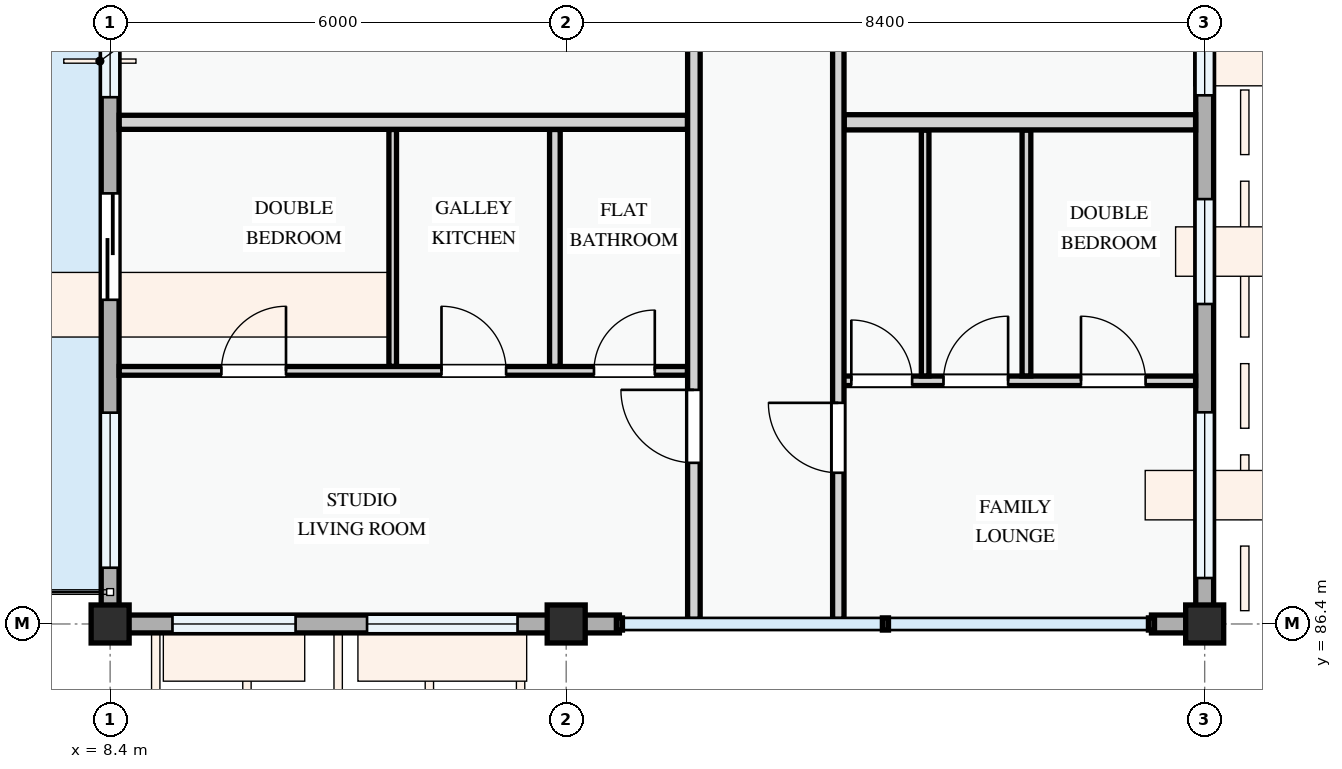
"""IFC4 building model, lengths in metres.
Left out: names, types, materials, properties, quantities, classifications, styles, units other than length and angle.
Written with IfcOpenShell. Run it as: python <this file> out.ifc"""

import sys

from ifc_helpers import new_model, si_unit, direction, frame, frame_2d, origin, origin_2d, place, context, subcontext, project, spatial, rectangle, extrude, element, fill, save


model = new_model("IFC4")
c1 = context("Model", 3, precision=1e-05, world=origin(), true_north=direction((0.0, 1.0)))
c2 = subcontext(c1, "Body", "Model", "MODEL_VIEW")
j1 = project(units=[si_unit("LENGTHUNIT", "METRE"), si_unit("PLANEANGLEUNIT", "RADIAN")], contexts=[c1])
p1 = place(None, origin())
s1 = spatial("IfcSite", under=j1, at=p1, CompositionType="ELEMENT")
p2 = place(p1, origin())
s2 = spatial("IfcBuilding", under=s1, at=p2, CompositionType="ELEMENT")
p3 = place(p2, frame((0.0, 0.0, 44.4)))
s3 = spatial("IfcBuildingStorey", under=s2, at=p3, CompositionType="ELEMENT", Elevation=44.4)
for number, where, z_axis, x_axis in (
    (1, (8.4, 86.4, 0.0), (0.0, 0.0, 1.0), (1.0, 0.0, 0.0)),
    (2, (14.4, 86.4, 0.0), (0.0, 0.0, 1.0), (1.0, 0.0, 0.0)),
    (3, (22.8, 86.4, 0.0), (0.0, 0.0, 1.0), (1.0, 0.0, 0.0)),
):
    element("IfcColumn", number, at=place(p3, frame(where, z_axis=z_axis, x_axis=x_axis)), inside=s3, PredefinedType="COLUMN", context=c2, shape_type="SweptSolid", body=[
        extrude(rectangle(XDim=0.5, YDim=0.5, at=origin_2d()), origin(), (0.0, 0.0, 1.0), 3.3),
    ])
p4 = place(p3, frame((8.4, 94.8, 0.0), z_axis=(0.0, 0.0, 1.0), x_axis=(0.0, -1.0, 0.0)))
e4 = element("IfcWall", 4, at=p4, inside=s3, PredefinedType="STANDARD", context=c2, shape_type="SweptSolid", body=[
    extrude(rectangle(XDim=8.4, YDim=0.235, at=frame_2d((4.2, 0.0))), origin(), (0.0, 0.0, 1.0), 2.425),
])
p5 = place(p4, frame((2.735, 0.0, 0.0)))
e5 = element("IfcOpeningElement", 5, at=p5, cuts=e4, PredefinedType="OPENING", context=c2, shape_type="SweptSolid", body=[
    extrude(rectangle(XDim=1.4, YDim=2.2, at=frame_2d((0.7, 1.1))), frame((0.0, 0.127, 0.0), z_axis=(0.0, -1.0, 0.0), x_axis=(1.0, 0.0, 0.0)), (0.0, 0.0, 1.0), 0.255),
])
p6 = place(p4, frame((0.52, 0.0, 0.78)))
e6 = element("IfcOpeningElement", 6, at=p6, cuts=e4, PredefinedType="OPENING", context=c2, shape_type="SweptSolid", body=[
    extrude(rectangle(XDim=0.95, YDim=1.15, at=frame_2d((0.475, 0.575))), frame((0.0, 0.127, 0.0), z_axis=(0.0, -1.0, 0.0), x_axis=(1.0, 0.0, 0.0)), (0.0, 0.0, 1.0), 0.255),
])
p7 = place(p4, frame((5.62, 0.0, 0.78)))
e7 = element("IfcOpeningElement", 7, at=p7, cuts=e4, PredefinedType="OPENING", context=c2, shape_type="SweptSolid", body=[
    extrude(rectangle(XDim=2.04, YDim=1.46, at=frame_2d((1.02, 0.73))), frame((0.0, 0.127, 0.0), z_axis=(0.0, -1.0, 0.0), x_axis=(1.0, 0.0, 0.0)), (0.0, 0.0, 1.0), 0.255),
])
p8 = place(p3, frame((8.4, 86.4, 0.0), z_axis=(0.0, 0.0, 1.0), x_axis=(1.0, 0.0, 0.0)))
e8 = element("IfcWall", 8, at=p8, inside=s3, PredefinedType="STANDARD", context=c2, shape_type="SweptSolid", body=[
    extrude(rectangle(XDim=6.0, YDim=0.235, at=frame_2d((3.0, 0.0))), origin(), (0.0, 0.0, 1.0), 2.525),
])
p9 = place(p8, frame((0.82, 0.0, 0.78)))
e9 = element("IfcOpeningElement", 9, at=p9, cuts=e8, PredefinedType="OPENING", context=c2, shape_type="SweptSolid", body=[
    extrude(rectangle(XDim=1.62, YDim=1.38, at=frame_2d((0.81, 0.69))), frame((0.0, 0.127, 0.0), z_axis=(0.0, -1.0, 0.0), x_axis=(1.0, 0.0, 0.0)), (0.0, 0.0, 1.0), 0.255),
])
p10 = place(p8, frame((3.38, 0.0, 0.78)))
e10 = element("IfcOpeningElement", 10, at=p10, cuts=e8, PredefinedType="OPENING", context=c2, shape_type="SweptSolid", body=[
    extrude(rectangle(XDim=1.98, YDim=1.5, at=frame_2d((0.99, 0.75))), frame((0.0, 0.127, 0.0), z_axis=(0.0, -1.0, 0.0), x_axis=(1.0, 0.0, 0.0)), (0.0, 0.0, 1.0), 0.255),
])
p11 = place(p3, frame((14.4, 86.4, 0.0), z_axis=(0.0, 0.0, 1.0), x_axis=(1.0, 0.0, 0.0)))
e11 = element("IfcWall", 11, at=p11, inside=s3, PredefinedType="STANDARD", context=c2, shape_type="SweptSolid", body=[
    extrude(rectangle(XDim=0.7, YDim=0.235, at=frame_2d((0.35, 0.0))), origin(), (0.0, 0.0, 1.0), 2.375),
])
p12 = place(p3, frame((22.1, 86.4, 0.0), z_axis=(0.0, 0.0, 1.0), x_axis=(1.0, 0.0, 0.0)))
e12 = element("IfcWall", 12, at=p12, inside=s3, PredefinedType="STANDARD", context=c2, shape_type="SweptSolid", body=[
    extrude(rectangle(XDim=0.58, YDim=0.235, at=frame_2d((0.29, 0.0))), origin(), (0.0, 0.0, 1.0), 2.375),
])
p13 = place(p3, frame((22.8, 86.4, 0.0), z_axis=(0.0, 0.0, 1.0), x_axis=(0.0, 1.0, 0.0)))
e13 = element("IfcWall", 13, at=p13, inside=s3, PredefinedType="STANDARD", context=c2, shape_type="SweptSolid", body=[
    extrude(rectangle(XDim=8.4, YDim=0.235, at=frame_2d((4.2, 0.0))), origin(), (0.0, 0.0, 1.0), 2.425),
])
p14 = place(p13, frame((0.604, 0.0, 0.78)))
e14 = element("IfcOpeningElement", 14, at=p14, cuts=e13, PredefinedType="OPENING", context=c2, shape_type="SweptSolid", body=[
    extrude(rectangle(XDim=2.18, YDim=1.48, at=frame_2d((1.09, 0.74))), frame((0.0, 0.127, 0.0), z_axis=(0.0, -1.0, 0.0), x_axis=(1.0, 0.0, 0.0)), (0.0, 0.0, 1.0), 0.255),
])
p15 = place(p13, frame((4.21, 0.0, 0.78)))
e15 = element("IfcOpeningElement", 15, at=p15, cuts=e13, PredefinedType="OPENING", context=c2, shape_type="SweptSolid", body=[
    extrude(rectangle(XDim=1.38, YDim=1.48, at=frame_2d((0.69, 0.74))), frame((0.0, 0.127, 0.0), z_axis=(0.0, -1.0, 0.0), x_axis=(1.0, 0.0, 0.0)), (0.0, 0.0, 1.0), 0.255),
])
p16 = place(p13, frame((6.955, 0.0, 0.78)))
e16 = element("IfcOpeningElement", 16, at=p16, cuts=e13, PredefinedType="OPENING", context=c2, shape_type="SweptSolid", body=[
    extrude(rectangle(XDim=0.9, YDim=1.2, at=frame_2d((0.45, 0.6))), frame((0.0, 0.127, 0.0), z_axis=(0.0, -1.0, 0.0), x_axis=(1.0, 0.0, 0.0)), (0.0, 0.0, 1.0), 0.255),
])
p17 = place(p3, frame((8.52, 89.73, 0.0), z_axis=(0.0, 0.0, 1.0), x_axis=(1.0, 0.0, 0.0)))
e17 = element("IfcWall", 17, at=p17, inside=s3, PredefinedType="PARTITIONING", context=c2, shape_type="SweptSolid", body=[
    extrude(rectangle(XDim=7.476, YDim=0.115, at=frame_2d((3.738, 0.0))), origin(), (0.0, 0.0, 1.0), 3.0),
])
p18 = place(p17, frame((1.344, 0.0, 0.0)))
e18 = element("IfcOpeningElement", 18, at=p18, cuts=e17, PredefinedType="OPENING", context=c2, shape_type="SweptSolid", body=[
    extrude(rectangle(XDim=0.85, YDim=2.1, at=frame_2d((0.425, 1.05))), frame((0.0, 0.067, 0.0), z_axis=(0.0, -1.0, 0.0), x_axis=(1.0, 0.0, 0.0)), (0.0, 0.0, 1.0), 0.135),
])
p19 = place(p17, frame((4.24, 0.0, 0.0)))
e19 = element("IfcOpeningElement", 19, at=p19, cuts=e17, PredefinedType="OPENING", context=c2, shape_type="SweptSolid", body=[
    extrude(rectangle(XDim=0.85, YDim=2.1, at=frame_2d((0.425, 1.05))), frame((0.0, 0.067, 0.0), z_axis=(0.0, -1.0, 0.0), x_axis=(1.0, 0.0, 0.0)), (0.0, 0.0, 1.0), 0.135),
])
p20 = place(p17, frame((6.246, 0.0, 0.0)))
e20 = element("IfcOpeningElement", 20, at=p20, cuts=e17, PredefinedType="OPENING", context=c2, shape_type="SweptSolid", body=[
    extrude(rectangle(XDim=0.8, YDim=2.1, at=frame_2d((0.4, 1.05))), frame((0.0, 0.067, 0.0), z_axis=(0.0, -1.0, 0.0), x_axis=(1.0, 0.0, 0.0)), (0.0, 0.0, 1.0), 0.135),
])
p21 = place(p3, frame((12.118, 89.79, 0.0), z_axis=(0.0, 0.0, 1.0), x_axis=(0.0, 1.0, 0.0)))
e21 = element("IfcWall", 21, at=p21, inside=s3, PredefinedType="PARTITIONING", context=c2, shape_type="SweptSolid", body=[
    extrude(rectangle(XDim=3.116, YDim=0.1, at=frame_2d((1.558, 0.0))), origin(), (0.0, 0.0, 1.0), 3.0),
])
p22 = place(p3, frame((14.251, 89.79, 0.0), z_axis=(0.0, 0.0, 1.0), x_axis=(0.0, 1.0, 0.0)))
e22 = element("IfcWall", 22, at=p22, inside=s3, PredefinedType="PARTITIONING", context=c2, shape_type="SweptSolid", body=[
    extrude(rectangle(XDim=3.116, YDim=0.14, at=frame_2d((1.558, 0.0))), origin(), (0.0, 0.0, 1.0), 2.425),
])
p23 = place(p3, frame((17.98, 89.599, 0.0), z_axis=(0.0, 0.0, 1.0), x_axis=(1.0, 0.0, 0.0)))
e23 = element("IfcWall", 23, at=p23, inside=s3, PredefinedType="PARTITIONING", context=c2, shape_type="SweptSolid", body=[
    extrude(rectangle(XDim=4.7, YDim=0.125, at=frame_2d((2.35, 0.0))), origin(), (0.0, 0.0, 1.0), 3.0),
])
p24 = place(p23, frame((0.171, 0.0, 0.0)))
e24 = element("IfcOpeningElement", 24, at=p24, cuts=e23, PredefinedType="OPENING", context=c2, shape_type="SweptSolid", body=[
    extrude(rectangle(XDim=0.8, YDim=2.1, at=frame_2d((0.4, 1.05))), frame((0.0, 0.073, 0.0), z_axis=(0.0, -1.0, 0.0), x_axis=(1.0, 0.0, 0.0)), (0.0, 0.0, 1.0), 0.145),
])
p25 = place(p23, frame((1.384, 0.0, 0.0)))
e25 = element("IfcOpeningElement", 25, at=p25, cuts=e23, PredefinedType="OPENING", context=c2, shape_type="SweptSolid", body=[
    extrude(rectangle(XDim=0.85, YDim=2.1, at=frame_2d((0.425, 1.05))), frame((0.0, 0.073, 0.0), z_axis=(0.0, -1.0, 0.0), x_axis=(1.0, 0.0, 0.0)), (0.0, 0.0, 1.0), 0.145),
])
p26 = place(p23, frame((3.193, 0.0, 0.0)))
e26 = element("IfcOpeningElement", 26, at=p26, cuts=e23, PredefinedType="OPENING", context=c2, shape_type="SweptSolid", body=[
    extrude(rectangle(XDim=0.85, YDim=2.1, at=frame_2d((0.425, 1.05))), frame((0.0, 0.073, 0.0), z_axis=(0.0, -1.0, 0.0), x_axis=(1.0, 0.0, 0.0)), (0.0, 0.0, 1.0), 0.145),
])
p27 = place(p3, frame((20.455, 89.664, 0.0), z_axis=(0.0, 0.0, 1.0), x_axis=(0.0, 1.0, 0.0)))
e27 = element("IfcWall", 27, at=p27, inside=s3, PredefinedType="PARTITIONING", context=c2, shape_type="SweptSolid", body=[
    extrude(rectangle(XDim=3.234, YDim=0.115, at=frame_2d((1.617, 0.0))), origin(), (0.0, 0.0, 1.0), 3.0),
])
p28 = place(p3, frame((19.122, 89.664, 0.0), z_axis=(0.0, 0.0, 1.0), x_axis=(0.0, 1.0, 0.0)))
e28 = element("IfcWall", 28, at=p28, inside=s3, PredefinedType="PARTITIONING", context=c2, shape_type="SweptSolid", body=[
    extrude(rectangle(XDim=3.234, YDim=0.1, at=frame_2d((1.617, 0.0))), origin(), (0.0, 0.0, 1.0), 3.0),
])
p29 = place(p3, frame((8.52, 93.0, 0.0), z_axis=(0.0, 0.0, 1.0), x_axis=(1.0, 0.0, 0.0)))
e29 = element("IfcWall", 29, at=p29, inside=s3, PredefinedType="PARTITIONING", context=c2, shape_type="SweptSolid", body=[
    extrude(rectangle(XDim=7.476, YDim=0.185, at=frame_2d((3.738, 0.0))), origin(), (0.0, 0.0, 1.0), 3.0),
])
p30 = place(p3, frame((18.057, 93.0, 0.0), z_axis=(0.0, 0.0, 1.0), x_axis=(1.0, 0.0, 0.0)))
e30 = element("IfcWall", 30, at=p30, inside=s3, PredefinedType="PARTITIONING", context=c2, shape_type="SweptSolid", body=[
    extrude(rectangle(XDim=4.624, YDim=0.2, at=frame_2d((2.312, 0.0))), origin(), (0.0, 0.0, 1.0), 3.0),
])
p31 = place(p3, frame((16.08, 86.46, 0.0), z_axis=(0.0, 0.0, 1.0), x_axis=(0.0, 1.0, 0.0)))
e31 = element("IfcWall", 31, at=p31, inside=s3, PredefinedType="PARTITIONING", context=c2, shape_type="SweptSolid", body=[
    extrude(rectangle(XDim=22.88, YDim=0.165, at=frame_2d((11.44, 0.0))), origin(), (0.0, 0.0, 1.0), 3.0),
])
p32 = place(p31, frame((2.06, 0.0, 0.0)))
e32 = element("IfcOpeningElement", 32, at=p32, cuts=e31, PredefinedType="OPENING", context=c2, shape_type="SweptSolid", body=[
    extrude(rectangle(XDim=0.96, YDim=2.12, at=frame_2d((0.48, 1.06))), frame((0.0, 0.093, 0.0), z_axis=(0.0, -1.0, 0.0), x_axis=(1.0, 0.0, 0.0)), (0.0, 0.0, 1.0), 0.185),
])
p33 = place(p31, frame((10.845, 0.0, 0.0)))
e33 = element("IfcOpeningElement", 33, at=p33, cuts=e31, PredefinedType="OPENING", context=c2, shape_type="SweptSolid", body=[
    extrude(rectangle(XDim=0.92, YDim=2.1, at=frame_2d((0.46, 1.05))), frame((0.0, 0.093, 0.0), z_axis=(0.0, -1.0, 0.0), x_axis=(1.0, 0.0, 0.0)), (0.0, 0.0, 1.0), 0.185),
])
p34 = place(p3, frame((17.98, 86.46, 0.0), z_axis=(0.0, 0.0, 1.0), x_axis=(0.0, 1.0, 0.0)))
e34 = element("IfcWall", 34, at=p34, inside=s3, PredefinedType="PARTITIONING", context=c2, shape_type="SweptSolid", body=[
    extrude(rectangle(XDim=22.88, YDim=0.15, at=frame_2d((11.44, 0.0))), origin(), (0.0, 0.0, 1.0), 3.0),
])
p35 = place(p34, frame((1.929, 0.0, 0.0)))
e35 = element("IfcOpeningElement", 35, at=p35, cuts=e34, PredefinedType="OPENING", context=c2, shape_type="SweptSolid", body=[
    extrude(rectangle(XDim=0.92, YDim=2.1, at=frame_2d((0.46, 1.05))), frame((0.0, 0.085, 0.0), z_axis=(0.0, -1.0, 0.0), x_axis=(1.0, 0.0, 0.0)), (0.0, 0.0, 1.0), 0.17),
])
p36 = place(p34, frame((10.832, 0.0, 0.0)))
e36 = element("IfcOpeningElement", 36, at=p36, cuts=e34, PredefinedType="OPENING", context=c2, shape_type="SweptSolid", body=[
    extrude(rectangle(XDim=0.92, YDim=2.1, at=frame_2d((0.46, 1.05))), frame((0.0, 0.085, 0.0), z_axis=(0.0, -1.0, 0.0), x_axis=(1.0, 0.0, 0.0)), (0.0, 0.0, 1.0), 0.17),
])
p37 = place(p5, frame((1.4, 0.0, 0.0), z_axis=(0.0, 0.0, 1.0), x_axis=(-1.0, 0.0, 0.0)))
e37 = element("IfcDoor", 37, at=p37, inside=s3, OperationType="SLIDING_TO_LEFT", PredefinedType="DOOR", context=c2, shape_type="SweptSolid", body=[
    extrude(rectangle(XDim=1.4, YDim=2.2, at=frame_2d((0.7, 1.1))), frame((0.0, 0.025, 0.0), z_axis=(0.0, -1.0, 0.0), x_axis=(1.0, 0.0, 0.0)), (0.0, 0.0, 1.0), 0.05),
])
fill(e5, e37)
p38 = place(p6, origin())
e38 = element("IfcWindow", 38, at=p38, inside=s3, PartitioningType="SINGLE_PANEL", PredefinedType="WINDOW", context=c2, shape_type="SweptSolid", body=[
    extrude(rectangle(XDim=0.95, YDim=1.15, at=frame_2d((0.475, 0.575))), frame((0.0, 0.03, 0.0), z_axis=(0.0, -1.0, 0.0), x_axis=(1.0, 0.0, 0.0)), (0.0, 0.0, 1.0), 0.06),
])
fill(e6, e38)
p39 = place(p7, origin())
e39 = element("IfcWindow", 39, at=p39, inside=s3, PartitioningType="DOUBLE_PANEL_VERTICAL", PredefinedType="WINDOW", context=c2, shape_type="SweptSolid", body=[
    extrude(rectangle(XDim=2.04, YDim=1.46, at=frame_2d((1.02, 0.73))), frame((0.0, 0.03, 0.0), z_axis=(0.0, -1.0, 0.0), x_axis=(1.0, 0.0, 0.0)), (0.0, 0.0, 1.0), 0.06),
])
fill(e7, e39)
p40 = place(p9, origin())
e40 = element("IfcWindow", 40, at=p40, inside=s3, PartitioningType="DOUBLE_PANEL_VERTICAL", PredefinedType="WINDOW", context=c2, shape_type="SweptSolid", body=[
    extrude(rectangle(XDim=1.62, YDim=1.38, at=frame_2d((0.81, 0.69))), frame((0.0, 0.03, 0.0), z_axis=(0.0, -1.0, 0.0), x_axis=(1.0, 0.0, 0.0)), (0.0, 0.0, 1.0), 0.06),
])
fill(e9, e40)
p41 = place(p10, origin())
e41 = element("IfcWindow", 41, at=p41, inside=s3, PartitioningType="DOUBLE_PANEL_VERTICAL", PredefinedType="WINDOW", context=c2, shape_type="SweptSolid", body=[
    extrude(rectangle(XDim=1.98, YDim=1.5, at=frame_2d((0.99, 0.75))), frame((0.0, 0.03, 0.0), z_axis=(0.0, -1.0, 0.0), x_axis=(1.0, 0.0, 0.0)), (0.0, 0.0, 1.0), 0.06),
])
fill(e10, e41)
p42 = place(p14, origin())
e42 = element("IfcWindow", 42, at=p42, inside=s3, PartitioningType="DOUBLE_PANEL_VERTICAL", PredefinedType="WINDOW", context=c2, shape_type="SweptSolid", body=[
    extrude(rectangle(XDim=2.18, YDim=1.48, at=frame_2d((1.09, 0.74))), frame((0.0, 0.03, 0.0), z_axis=(0.0, -1.0, 0.0), x_axis=(1.0, 0.0, 0.0)), (0.0, 0.0, 1.0), 0.06),
])
fill(e14, e42)
p43 = place(p15, origin())
e43 = element("IfcWindow", 43, at=p43, inside=s3, PartitioningType="SINGLE_PANEL", PredefinedType="WINDOW", context=c2, shape_type="SweptSolid", body=[
    extrude(rectangle(XDim=1.38, YDim=1.48, at=frame_2d((0.69, 0.74))), frame((0.0, 0.03, 0.0), z_axis=(0.0, -1.0, 0.0), x_axis=(1.0, 0.0, 0.0)), (0.0, 0.0, 1.0), 0.06),
])
fill(e15, e43)
p44 = place(p16, origin())
e44 = element("IfcWindow", 44, at=p44, inside=s3, PartitioningType="SINGLE_PANEL", PredefinedType="WINDOW", context=c2, shape_type="SweptSolid", body=[
    extrude(rectangle(XDim=0.9, YDim=1.2, at=frame_2d((0.45, 0.6))), frame((0.0, 0.03, 0.0), z_axis=(0.0, -1.0, 0.0), x_axis=(1.0, 0.0, 0.0)), (0.0, 0.0, 1.0), 0.06),
])
fill(e16, e44)
p45 = place(p18, origin())
e45 = element("IfcDoor", 45, at=p45, inside=s3, OperationType="SINGLE_SWING_RIGHT", PredefinedType="DOOR", context=c2, shape_type="SweptSolid", body=[
    extrude(rectangle(XDim=0.85, YDim=2.1, at=frame_2d((0.425, 1.05))), frame((0.0, 0.025, 0.0), z_axis=(0.0, -1.0, 0.0), x_axis=(1.0, 0.0, 0.0)), (0.0, 0.0, 1.0), 0.05),
])
fill(e18, e45)
p46 = place(p19, origin())
e46 = element("IfcDoor", 46, at=p46, inside=s3, OperationType="SINGLE_SWING_LEFT", PredefinedType="DOOR", context=c2, shape_type="SweptSolid", body=[
    extrude(rectangle(XDim=0.85, YDim=2.1, at=frame_2d((0.425, 1.05))), frame((0.0, 0.025, 0.0), z_axis=(0.0, -1.0, 0.0), x_axis=(1.0, 0.0, 0.0)), (0.0, 0.0, 1.0), 0.05),
])
fill(e19, e46)
p47 = place(p20, origin())
e47 = element("IfcDoor", 47, at=p47, inside=s3, OperationType="SINGLE_SWING_RIGHT", PredefinedType="DOOR", context=c2, shape_type="SweptSolid", body=[
    extrude(rectangle(XDim=0.8, YDim=2.1, at=frame_2d((0.4, 1.05))), frame((0.0, 0.025, 0.0), z_axis=(0.0, -1.0, 0.0), x_axis=(1.0, 0.0, 0.0)), (0.0, 0.0, 1.0), 0.05),
])
fill(e20, e47)
p48 = place(p24, origin())
e48 = element("IfcDoor", 48, at=p48, inside=s3, OperationType="SINGLE_SWING_LEFT", PredefinedType="DOOR", context=c2, shape_type="SweptSolid", body=[
    extrude(rectangle(XDim=0.8, YDim=2.1, at=frame_2d((0.4, 1.05))), frame((0.0, 0.025, 0.0), z_axis=(0.0, -1.0, 0.0), x_axis=(1.0, 0.0, 0.0)), (0.0, 0.0, 1.0), 0.05),
])
fill(e24, e48)
p49 = place(p25, origin())
e49 = element("IfcDoor", 49, at=p49, inside=s3, OperationType="SINGLE_SWING_RIGHT", PredefinedType="DOOR", context=c2, shape_type="SweptSolid", body=[
    extrude(rectangle(XDim=0.85, YDim=2.1, at=frame_2d((0.425, 1.05))), frame((0.0, 0.025, 0.0), z_axis=(0.0, -1.0, 0.0), x_axis=(1.0, 0.0, 0.0)), (0.0, 0.0, 1.0), 0.05),
])
fill(e25, e49)
p50 = place(p26, origin())
e50 = element("IfcDoor", 50, at=p50, inside=s3, OperationType="SINGLE_SWING_LEFT", PredefinedType="DOOR", context=c2, shape_type="SweptSolid", body=[
    extrude(rectangle(XDim=0.85, YDim=2.1, at=frame_2d((0.425, 1.05))), frame((0.0, 0.025, 0.0), z_axis=(0.0, -1.0, 0.0), x_axis=(1.0, 0.0, 0.0)), (0.0, 0.0, 1.0), 0.05),
])
fill(e26, e50)
p51 = place(p32, origin())
e51 = element("IfcDoor", 51, at=p51, inside=s3, OperationType="SINGLE_SWING_RIGHT", PredefinedType="DOOR", context=c2, shape_type="SweptSolid", body=[
    extrude(rectangle(XDim=0.96, YDim=2.12, at=frame_2d((0.48, 1.06))), frame((0.0, 0.025, 0.0), z_axis=(0.0, -1.0, 0.0), x_axis=(1.0, 0.0, 0.0)), (0.0, 0.0, 1.0), 0.05),
])
fill(e32, e51)
p52 = place(p35, origin())
e52 = element("IfcDoor", 52, at=p52, inside=s3, OperationType="SINGLE_SWING_RIGHT", PredefinedType="DOOR", context=c2, shape_type="SweptSolid", body=[
    extrude(rectangle(XDim=0.92, YDim=2.1, at=frame_2d((0.46, 1.05))), frame((0.0, 0.025, 0.0), z_axis=(0.0, -1.0, 0.0), x_axis=(1.0, 0.0, 0.0)), (0.0, 0.0, 1.0), 0.05),
])
fill(e35, e52)
save(model, sys.argv[1])
